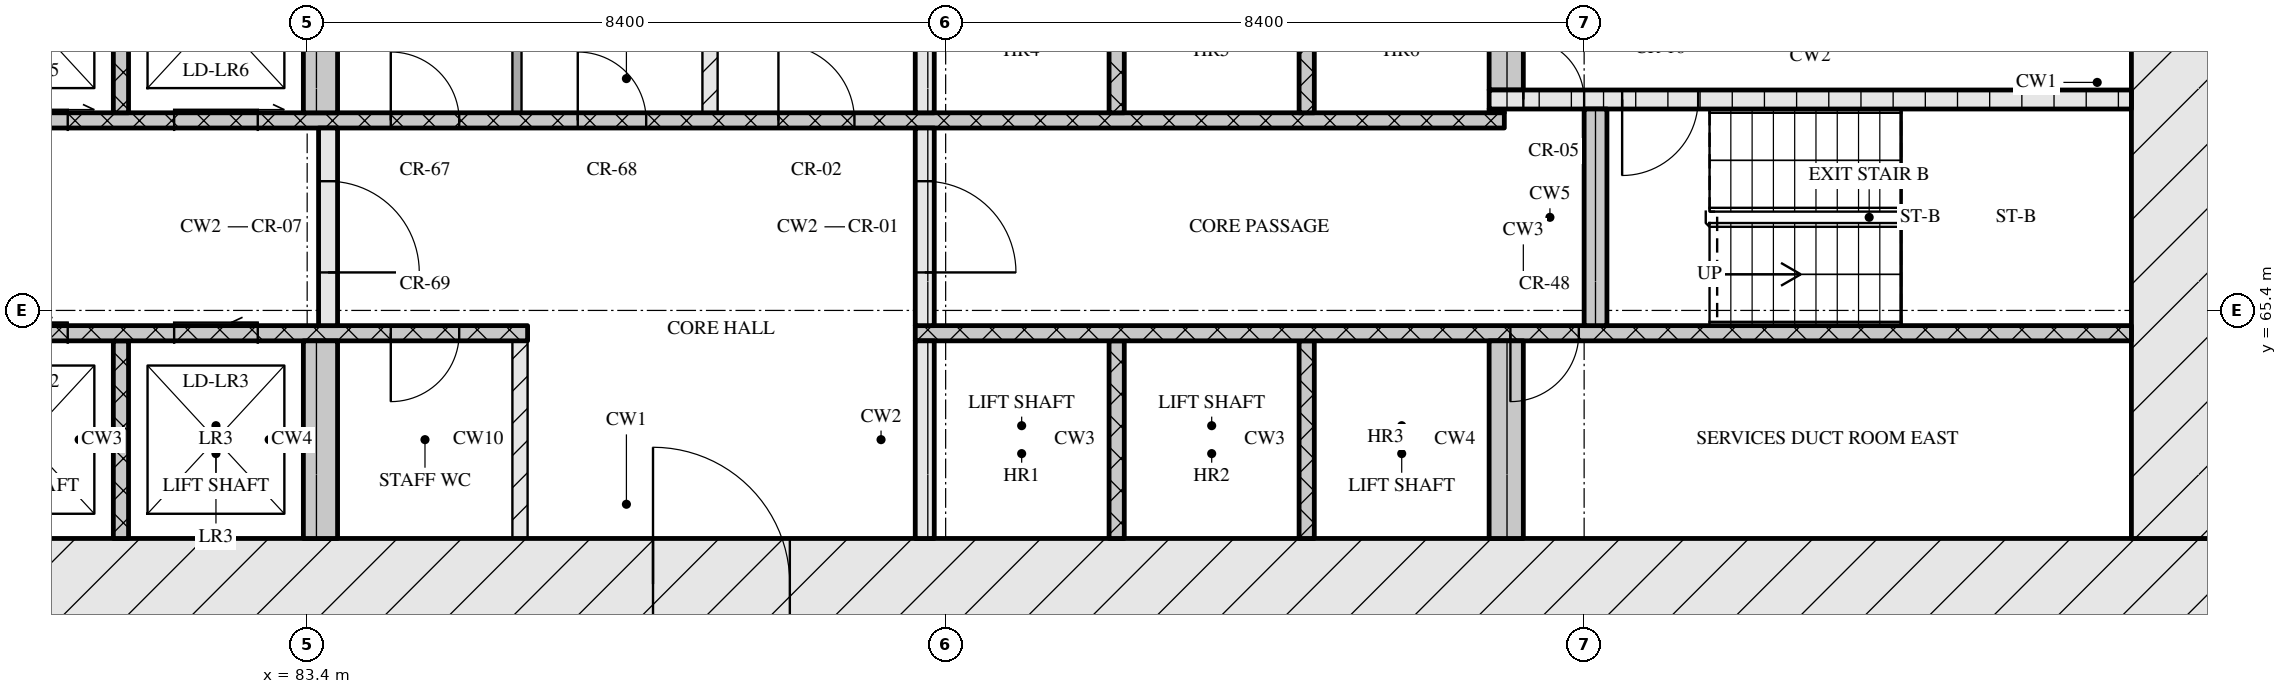
"""IFC4 building model, lengths in metres.
Left out: names, types, materials, properties, quantities, classifications, styles, units other than length and angle.
Written with IfcOpenShell. Run it as: python <this file> out.ifc"""

import sys

from ifc_helpers import new_model, si_unit, direction, frame, frame_2d, origin, place, context, subcontext, project, spatial, rectangle, extrude, element, fill, save


model = new_model("IFC4")
c1 = context("Model", 3, precision=1e-05, world=origin(), true_north=direction((0.0, 1.0)))
c2 = subcontext(c1, "Body", "Model", "MODEL_VIEW")
j1 = project(units=[si_unit("LENGTHUNIT", "METRE"), si_unit("PLANEANGLEUNIT", "RADIAN")], contexts=[c1])
p1 = place(None, origin())
s1 = spatial("IfcSite", under=j1, at=p1, CompositionType="ELEMENT")
p2 = place(p1, origin())
s2 = spatial("IfcBuilding", under=s1, at=p2, CompositionType="ELEMENT")
p3 = place(p2, frame((0.0, 0.0, 66.0)))
s3 = spatial("IfcBuildingStorey", under=s2, at=p3, CompositionType="ELEMENT", Elevation=66.0)
p4 = place(p3, frame((66.6, 61.8, 0.0), z_axis=(0.0, 0.0, 1.0), x_axis=(1.0, 0.0, 0.0)))
e1 = element("IfcWall", 1, at=p4, inside=s3, PredefinedType="SOLIDWALL", context=c2, shape_type="SweptSolid", body=[
    extrude(rectangle(XDim=42.0, YDim=1.2, at=frame_2d((21.0, 0.0))), origin(), (0.0, 0.0, 1.0), 3.32),
])
p5 = place(p4, frame((21.35, 0.0, 0.0)))
e2 = element("IfcOpeningElement", 2, at=p5, cuts=e1, PredefinedType="OPENING", context=c2, shape_type="SweptSolid", body=[
    extrude(rectangle(XDim=1.8, YDim=2.1, at=frame_2d((0.9, 1.05))), frame((0.0, 0.61, 0.0), z_axis=(0.0, -1.0, 0.0), x_axis=(1.0, 0.0, 0.0)), (0.0, 0.0, 1.0), 1.22),
])
p6 = place(p3, frame((108.0, 62.4, 0.0), z_axis=(0.0, 0.0, 1.0), x_axis=(0.0, 1.0, 0.0)))
e3 = element("IfcWall", 3, at=p6, inside=s3, PredefinedType="SOLIDWALL", context=c2, shape_type="SweptSolid", body=[
    extrude(rectangle(XDim=12.0, YDim=1.2, at=frame_2d((6.0, 0.0))), origin(), (0.0, 0.0, 1.0), 3.32),
])
p7 = place(p6, frame((6.45, 0.0, 0.0)))
e4 = element("IfcOpeningElement", 4, at=p7, cuts=e3, PredefinedType="OPENING", context=c2, shape_type="SweptSolid", body=[
    extrude(rectangle(XDim=1.2, YDim=2.1, at=frame_2d((0.6, 1.05))), frame((0.0, 0.61, 0.0), z_axis=(0.0, -1.0, 0.0), x_axis=(1.0, 0.0, 0.0)), (0.0, 0.0, 1.0), 1.22),
])
p8 = place(p3, frame((80.95, 62.4, 0.0), z_axis=(0.0, 0.0, 1.0), x_axis=(0.0, 1.0, 0.0)))
e5 = element("IfcWall", 5, at=p8, inside=s3, PredefinedType="SOLIDWALL", context=c2, shape_type="SweptSolid", body=[
    extrude(rectangle(XDim=2.6, YDim=0.2, at=frame_2d((1.3, 0.0))), origin(), (0.0, 0.0, 1.0), 3.32),
])
p9 = place(p3, frame((83.575, 62.4, 0.0), z_axis=(0.0, 0.0, 1.0), x_axis=(0.0, 1.0, 0.0)))
e6 = element("IfcWall", 6, at=p9, inside=s3, PredefinedType="SOLIDWALL", context=c2, shape_type="SweptSolid", body=[
    extrude(rectangle(XDim=2.6, YDim=0.45, at=frame_2d((1.3, 0.0))), origin(), (0.0, 0.0, 1.0), 3.32),
])
p10 = place(p3, frame((86.2, 62.4, 0.0), z_axis=(0.0, 0.0, 1.0), x_axis=(0.0, 1.0, 0.0)))
e7 = element("IfcWall", 7, at=p10, inside=s3, PredefinedType="PARTITIONING", context=c2, shape_type="SweptSolid", body=[
    extrude(rectangle(XDim=2.6, YDim=0.2, at=frame_2d((1.3, 0.0))), origin(), (0.0, 0.0, 1.0), 3.32),
])
p11 = place(p3, frame((91.525, 62.4, 0.0), z_axis=(0.0, 0.0, 1.0), x_axis=(0.0, 1.0, 0.0)))
e8 = element("IfcWall", 8, at=p11, inside=s3, PredefinedType="SOLIDWALL", context=c2, shape_type="SweptSolid", body=[
    extrude(rectangle(XDim=2.6, YDim=0.25, at=frame_2d((1.3, 0.0))), origin(), (0.0, 0.0, 1.0), 3.32),
])
for number, where, z_axis, x_axis in (
    (9, (94.05, 62.4, 0.0), (0.0, 0.0, 1.0), (0.0, 1.0, 0.0)),
    (10, (96.55, 62.4, 0.0), (0.0, 0.0, 1.0), (0.0, 1.0, 0.0)),
):
    element("IfcWall", number, at=place(p3, frame(where, z_axis=z_axis, x_axis=x_axis)), inside=s3, PredefinedType="SOLIDWALL", context=c2, shape_type="SweptSolid", body=[
        extrude(rectangle(XDim=2.6, YDim=0.2, at=frame_2d((1.3, 0.0))), origin(), (0.0, 0.0, 1.0), 3.32),
    ])
p12 = place(p3, frame((99.175, 62.4, 0.0), z_axis=(0.0, 0.0, 1.0), x_axis=(0.0, 1.0, 0.0)))
e11 = element("IfcWall", 11, at=p12, inside=s3, PredefinedType="SOLIDWALL", context=c2, shape_type="SweptSolid", body=[
    extrude(rectangle(XDim=2.6, YDim=0.45, at=frame_2d((1.3, 0.0))), origin(), (0.0, 0.0, 1.0), 3.32),
])
p13 = place(p3, frame((67.8, 65.1, 0.0), z_axis=(0.0, 0.0, 1.0), x_axis=(1.0, 0.0, 0.0)))
e12 = element("IfcWall", 12, at=p13, inside=s3, PredefinedType="SOLIDWALL", context=c2, shape_type="SweptSolid", body=[
    extrude(rectangle(XDim=18.5, YDim=0.2, at=frame_2d((9.25, 0.0))), origin(), (0.0, 0.0, 1.0), 3.32),
])
p14 = place(p13, frame((7.27, 0.0, 0.0)))
e13 = element("IfcOpeningElement", 13, at=p14, cuts=e12, PredefinedType="OPENING", context=c2, shape_type="SweptSolid", body=[
    extrude(rectangle(XDim=0.9, YDim=2.1, at=frame_2d((0.45, 1.05))), frame((0.0, 0.11, 0.0), z_axis=(0.0, -1.0, 0.0), x_axis=(1.0, 0.0, 0.0)), (0.0, 0.0, 1.0), 0.22),
])
p15 = place(p13, frame((8.85, 0.0, 0.0)))
e14 = element("IfcOpeningElement", 14, at=p15, cuts=e12, PredefinedType="OPENING", context=c2, shape_type="SweptSolid", body=[
    extrude(rectangle(XDim=1.1, YDim=2.1, at=frame_2d((0.55, 1.05))), frame((0.0, 0.11, 0.0), z_axis=(0.0, -1.0, 0.0), x_axis=(1.0, 0.0, 0.0)), (0.0, 0.0, 1.0), 0.22),
])
p16 = place(p13, frame((11.35, 0.0, 0.0)))
e15 = element("IfcOpeningElement", 15, at=p16, cuts=e12, PredefinedType="OPENING", context=c2, shape_type="SweptSolid", body=[
    extrude(rectangle(XDim=1.1, YDim=2.1, at=frame_2d((0.55, 1.05))), frame((0.0, 0.11, 0.0), z_axis=(0.0, -1.0, 0.0), x_axis=(1.0, 0.0, 0.0)), (0.0, 0.0, 1.0), 0.22),
])
p17 = place(p13, frame((13.85, 0.0, 0.0)))
e16 = element("IfcOpeningElement", 16, at=p17, cuts=e12, PredefinedType="OPENING", context=c2, shape_type="SweptSolid", body=[
    extrude(rectangle(XDim=1.1, YDim=2.1, at=frame_2d((0.55, 1.05))), frame((0.0, 0.11, 0.0), z_axis=(0.0, -1.0, 0.0), x_axis=(1.0, 0.0, 0.0)), (0.0, 0.0, 1.0), 0.22),
])
p18 = place(p13, frame((16.7, 0.0, 0.0)))
e17 = element("IfcOpeningElement", 17, at=p18, cuts=e12, PredefinedType="OPENING", context=c2, shape_type="SweptSolid", body=[
    extrude(rectangle(XDim=0.9, YDim=2.1, at=frame_2d((0.45, 1.05))), frame((0.0, 0.11, 0.0), z_axis=(0.0, -1.0, 0.0), x_axis=(1.0, 0.0, 0.0)), (0.0, 0.0, 1.0), 0.22),
])
p19 = place(p3, frame((91.4, 65.1, 0.0), z_axis=(0.0, 0.0, 1.0), x_axis=(1.0, 0.0, 0.0)))
e18 = element("IfcWall", 18, at=p19, inside=s3, PredefinedType="SOLIDWALL", context=c2, shape_type="SweptSolid", body=[
    extrude(rectangle(XDim=16.0, YDim=0.2, at=frame_2d((8.0, 0.0))), origin(), (0.0, 0.0, 1.0), 3.32),
])
p20 = place(p19, frame((7.83, 0.0, 0.0)))
e19 = element("IfcOpeningElement", 19, at=p20, cuts=e18, PredefinedType="OPENING", context=c2, shape_type="SweptSolid", body=[
    extrude(rectangle(XDim=0.9, YDim=2.1, at=frame_2d((0.45, 1.05))), frame((0.0, 0.11, 0.0), z_axis=(0.0, -1.0, 0.0), x_axis=(1.0, 0.0, 0.0)), (0.0, 0.0, 1.0), 0.22),
])
p21 = place(p3, frame((83.675, 65.2, 0.0), z_axis=(0.0, 0.0, 1.0), x_axis=(0.0, 1.0, 0.0)))
e20 = element("IfcWall", 20, at=p21, inside=s3, PredefinedType="SOLIDWALL", context=c2, shape_type="SweptSolid", body=[
    extrude(rectangle(XDim=2.6, YDim=0.25, at=frame_2d((1.3, 0.0))), origin(), (0.0, 0.0, 1.0), 3.32),
])
p22 = place(p21, frame((0.7, 0.0, 0.0)))
e21 = element("IfcOpeningElement", 21, at=p22, cuts=e20, PredefinedType="OPENING", context=c2, shape_type="SweptSolid", body=[
    extrude(rectangle(XDim=1.2, YDim=2.1, at=frame_2d((0.6, 1.05))), frame((0.0, 0.135, 0.0), z_axis=(0.0, -1.0, 0.0), x_axis=(1.0, 0.0, 0.0)), (0.0, 0.0, 1.0), 0.27),
])
p23 = place(p3, frame((91.525, 65.2, 0.0), z_axis=(0.0, 0.0, 1.0), x_axis=(0.0, 1.0, 0.0)))
e22 = element("IfcWall", 22, at=p23, inside=s3, PredefinedType="SOLIDWALL", context=c2, shape_type="SweptSolid", body=[
    extrude(rectangle(XDim=2.6, YDim=0.25, at=frame_2d((1.3, 0.0))), origin(), (0.0, 0.0, 1.0), 3.32),
])
p24 = place(p23, frame((0.7, 0.0, 0.0)))
e23 = element("IfcOpeningElement", 23, at=p24, cuts=e22, PredefinedType="OPENING", context=c2, shape_type="SweptSolid", body=[
    extrude(rectangle(XDim=1.2, YDim=2.1, at=frame_2d((0.6, 1.05))), frame((0.0, 0.135, 0.0), z_axis=(0.0, -1.0, 0.0), x_axis=(1.0, 0.0, 0.0)), (0.0, 0.0, 1.0), 0.27),
])
p25 = place(p3, frame((100.35, 65.2, 0.0), z_axis=(0.0, 0.0, 1.0), x_axis=(0.0, 1.0, 0.0)))
e24 = element("IfcWall", 24, at=p25, inside=s3, PredefinedType="SOLIDWALL", context=c2, shape_type="SweptSolid", body=[
    extrude(rectangle(XDim=2.85, YDim=0.3, at=frame_2d((1.425, 0.0))), origin(), (0.0, 0.0, 1.0), 3.32),
])
p26 = place(p3, frame((76.05, 67.9, 0.0), z_axis=(0.0, 0.0, 1.0), x_axis=(1.0, 0.0, 0.0)))
e25 = element("IfcWall", 25, at=p26, inside=s3, PredefinedType="SOLIDWALL", context=c2, shape_type="SweptSolid", body=[
    extrude(rectangle(XDim=23.1, YDim=0.2, at=frame_2d((11.55, 0.0))), origin(), (0.0, 0.0, 1.0), 3.32),
])
p27 = place(p26, frame((0.6, 0.0, 0.0)))
e26 = element("IfcOpeningElement", 26, at=p27, cuts=e25, PredefinedType="OPENING", context=c2, shape_type="SweptSolid", body=[
    extrude(rectangle(XDim=1.1, YDim=2.1, at=frame_2d((0.55, 1.05))), frame((0.0, 0.11, 0.0), z_axis=(0.0, -1.0, 0.0), x_axis=(1.0, 0.0, 0.0)), (0.0, 0.0, 1.0), 0.22),
])
p28 = place(p26, frame((3.1, 0.0, 0.0)))
e27 = element("IfcOpeningElement", 27, at=p28, cuts=e25, PredefinedType="OPENING", context=c2, shape_type="SweptSolid", body=[
    extrude(rectangle(XDim=1.1, YDim=2.1, at=frame_2d((0.55, 1.05))), frame((0.0, 0.11, 0.0), z_axis=(0.0, -1.0, 0.0), x_axis=(1.0, 0.0, 0.0)), (0.0, 0.0, 1.0), 0.22),
])
p29 = place(p26, frame((5.6, 0.0, 0.0)))
e28 = element("IfcOpeningElement", 28, at=p29, cuts=e25, PredefinedType="OPENING", context=c2, shape_type="SweptSolid", body=[
    extrude(rectangle(XDim=1.1, YDim=2.1, at=frame_2d((0.55, 1.05))), frame((0.0, 0.11, 0.0), z_axis=(0.0, -1.0, 0.0), x_axis=(1.0, 0.0, 0.0)), (0.0, 0.0, 1.0), 0.22),
])
p30 = place(p26, frame((8.45, 0.0, 0.0)))
e29 = element("IfcOpeningElement", 29, at=p30, cuts=e25, PredefinedType="OPENING", context=c2, shape_type="SweptSolid", body=[
    extrude(rectangle(XDim=0.9, YDim=2.1, at=frame_2d((0.45, 1.05))), frame((0.0, 0.11, 0.0), z_axis=(0.0, -1.0, 0.0), x_axis=(1.0, 0.0, 0.0)), (0.0, 0.0, 1.0), 0.22),
])
p31 = place(p26, frame((10.91, 0.0, 0.0)))
e30 = element("IfcOpeningElement", 30, at=p31, cuts=e25, PredefinedType="OPENING", context=c2, shape_type="SweptSolid", body=[
    extrude(rectangle(XDim=0.9, YDim=2.1, at=frame_2d((0.45, 1.05))), frame((0.0, 0.11, 0.0), z_axis=(0.0, -1.0, 0.0), x_axis=(1.0, 0.0, 0.0)), (0.0, 0.0, 1.0), 0.22),
])
p32 = place(p26, frame((13.55, 0.0, 0.0)))
e31 = element("IfcOpeningElement", 31, at=p32, cuts=e25, PredefinedType="OPENING", context=c2, shape_type="SweptSolid", body=[
    extrude(rectangle(XDim=1.0, YDim=2.1, at=frame_2d((0.5, 1.05))), frame((0.0, 0.11, 0.0), z_axis=(0.0, -1.0, 0.0), x_axis=(1.0, 0.0, 0.0)), (0.0, 0.0, 1.0), 0.22),
])
p33 = place(p3, frame((80.95, 68.0, 0.0), z_axis=(0.0, 0.0, 1.0), x_axis=(0.0, 1.0, 0.0)))
e32 = element("IfcWall", 32, at=p33, inside=s3, PredefinedType="SOLIDWALL", context=c2, shape_type="SweptSolid", body=[
    extrude(rectangle(XDim=2.6, YDim=0.2, at=frame_2d((1.3, 0.0))), origin(), (0.0, 0.0, 1.0), 3.32),
])
p34 = place(p3, frame((83.575, 68.0, 0.0), z_axis=(0.0, 0.0, 1.0), x_axis=(0.0, 1.0, 0.0)))
e33 = element("IfcWall", 33, at=p34, inside=s3, PredefinedType="SOLIDWALL", context=c2, shape_type="SweptSolid", body=[
    extrude(rectangle(XDim=2.6, YDim=0.45, at=frame_2d((1.3, 0.0))), origin(), (0.0, 0.0, 1.0), 3.32),
])
p35 = place(p3, frame((86.16, 68.0, 0.0), z_axis=(0.0, 0.0, 1.0), x_axis=(0.0, 1.0, 0.0)))
e34 = element("IfcWall", 34, at=p35, inside=s3, PredefinedType="PARTITIONING", context=c2, shape_type="SweptSolid", body=[
    extrude(rectangle(XDim=2.6, YDim=0.12, at=frame_2d((1.3, 0.0))), origin(), (0.0, 0.0, 1.0), 3.32),
])
p36 = place(p3, frame((88.7, 68.0, 0.0), z_axis=(0.0, 0.0, 1.0), x_axis=(0.0, 1.0, 0.0)))
e35 = element("IfcWall", 35, at=p36, inside=s3, PredefinedType="PARTITIONING", context=c2, shape_type="SweptSolid", body=[
    extrude(rectangle(XDim=2.6, YDim=0.2, at=frame_2d((1.3, 0.0))), origin(), (0.0, 0.0, 1.0), 3.32),
])
p37 = place(p3, frame((91.525, 68.0, 0.0), z_axis=(0.0, 0.0, 1.0), x_axis=(0.0, 1.0, 0.0)))
e36 = element("IfcWall", 36, at=p37, inside=s3, PredefinedType="SOLIDWALL", context=c2, shape_type="SweptSolid", body=[
    extrude(rectangle(XDim=2.6, YDim=0.25, at=frame_2d((1.3, 0.0))), origin(), (0.0, 0.0, 1.0), 3.32),
])
for number, where, z_axis, x_axis in (
    (37, (94.05, 68.0, 0.0), (0.0, 0.0, 1.0), (0.0, 1.0, 0.0)),
    (38, (96.55, 68.0, 0.0), (0.0, 0.0, 1.0), (0.0, 1.0, 0.0)),
):
    element("IfcWall", number, at=place(p3, frame(where, z_axis=z_axis, x_axis=x_axis)), inside=s3, PredefinedType="SOLIDWALL", context=c2, shape_type="SweptSolid", body=[
        extrude(rectangle(XDim=2.6, YDim=0.2, at=frame_2d((1.3, 0.0))), origin(), (0.0, 0.0, 1.0), 3.32),
    ])
p38 = place(p3, frame((98.95, 68.025, 0.0), z_axis=(0.0, 0.0, 1.0), x_axis=(1.0, 0.0, 0.0)))
e39 = element("IfcWall", 39, at=p38, inside=s3, PredefinedType="SOLIDWALL", context=c2, shape_type="SweptSolid", body=[
    extrude(rectangle(XDim=0.2, YDim=0.05, at=frame_2d((0.1, 0.0))), origin(), (0.0, 0.0, 1.0), 3.32),
])
p39 = place(p3, frame((98.95, 68.175, 0.0), z_axis=(0.0, 0.0, 1.0), x_axis=(1.0, 0.0, 0.0)))
e40 = element("IfcWall", 40, at=p39, inside=s3, PredefinedType="SOLIDWALL", context=c2, shape_type="SweptSolid", body=[
    extrude(rectangle(XDim=8.45, YDim=0.25, at=frame_2d((4.225, 0.0))), origin(), (0.0, 0.0, 1.0), 3.32),
])
p40 = place(p39, frame((0.45, 0.0, 0.0)))
e41 = element("IfcOpeningElement", 41, at=p40, cuts=e40, PredefinedType="OPENING", context=c2, shape_type="SweptSolid", body=[
    extrude(rectangle(XDim=0.8, YDim=2.1, at=frame_2d((0.4, 1.05))), frame((0.0, 0.135, 0.0), z_axis=(0.0, -1.0, 0.0), x_axis=(1.0, 0.0, 0.0)), (0.0, 0.0, 1.0), 0.27),
])
p41 = place(p39, frame((1.75, 0.0, 0.0)))
e42 = element("IfcOpeningElement", 42, at=p41, cuts=e40, PredefinedType="OPENING", context=c2, shape_type="SweptSolid", body=[
    extrude(rectangle(XDim=1.0, YDim=2.1, at=frame_2d((0.5, 1.05))), frame((0.0, 0.135, 0.0), z_axis=(0.0, -1.0, 0.0), x_axis=(1.0, 0.0, 0.0)), (0.0, 0.0, 1.0), 0.27),
])
p42 = place(p3, frame((99.175, 68.3, 0.0), z_axis=(0.0, 0.0, 1.0), x_axis=(0.0, 1.0, 0.0)))
e43 = element("IfcWall", 43, at=p42, inside=s3, PredefinedType="SOLIDWALL", context=c2, shape_type="SweptSolid", body=[
    extrude(rectangle(XDim=2.3, YDim=0.45, at=frame_2d((1.15, 0.0))), origin(), (0.0, 0.0, 1.0), 3.32),
])
p43 = place(p5, origin())
e44 = element("IfcDoor", 44, at=p43, inside=s3, OperationType="DOUBLE_DOOR_SINGLE_SWING", PredefinedType="DOOR", context=c2, shape_type="SweptSolid", body=[
    extrude(rectangle(XDim=1.8, YDim=2.1, at=frame_2d((0.9, 1.05))), frame((0.0, 0.025, 0.0), z_axis=(0.0, -1.0, 0.0), x_axis=(1.0, 0.0, 0.0)), (0.0, 0.0, 1.0), 0.05),
])
fill(e2, e44)
p44 = place(p16, origin())
e45 = element("IfcDoor", 45, at=p44, inside=s3, OperationType="SLIDING_TO_LEFT", PredefinedType="DOOR", context=c2, shape_type="SweptSolid", body=[
    extrude(rectangle(XDim=1.1, YDim=2.1, at=frame_2d((0.55, 1.05))), frame((0.0, 0.025, 0.0), z_axis=(0.0, -1.0, 0.0), x_axis=(1.0, 0.0, 0.0)), (0.0, 0.0, 1.0), 0.05),
])
fill(e15, e45)
p45 = place(p17, origin())
e46 = element("IfcDoor", 46, at=p45, inside=s3, OperationType="SLIDING_TO_LEFT", PredefinedType="DOOR", context=c2, shape_type="SweptSolid", body=[
    extrude(rectangle(XDim=1.1, YDim=2.1, at=frame_2d((0.55, 1.05))), frame((0.0, 0.025, 0.0), z_axis=(0.0, -1.0, 0.0), x_axis=(1.0, 0.0, 0.0)), (0.0, 0.0, 1.0), 0.05),
])
fill(e16, e46)
p46 = place(p18, origin())
e47 = element("IfcDoor", 47, at=p46, inside=s3, OperationType="SINGLE_SWING_RIGHT", PredefinedType="DOOR", context=c2, shape_type="SweptSolid", body=[
    extrude(rectangle(XDim=0.9, YDim=2.1, at=frame_2d((0.45, 1.05))), frame((0.0, 0.025, 0.0), z_axis=(0.0, -1.0, 0.0), x_axis=(1.0, 0.0, 0.0)), (0.0, 0.0, 1.0), 0.05),
])
fill(e17, e47)
p47 = place(p20, origin())
e48 = element("IfcDoor", 48, at=p47, inside=s3, OperationType="SINGLE_SWING_RIGHT", PredefinedType="DOOR", context=c2, shape_type="SweptSolid", body=[
    extrude(rectangle(XDim=0.9, YDim=2.1, at=frame_2d((0.45, 1.05))), frame((0.0, 0.025, 0.0), z_axis=(0.0, -1.0, 0.0), x_axis=(1.0, 0.0, 0.0)), (0.0, 0.0, 1.0), 0.05),
])
fill(e19, e48)
p48 = place(p22, origin())
e49 = element("IfcDoor", 49, at=p48, inside=s3, OperationType="SINGLE_SWING_RIGHT", PredefinedType="DOOR", context=c2, shape_type="SweptSolid", body=[
    extrude(rectangle(XDim=1.2, YDim=2.1, at=frame_2d((0.6, 1.05))), frame((0.0, 0.025, 0.0), z_axis=(0.0, -1.0, 0.0), x_axis=(1.0, 0.0, 0.0)), (0.0, 0.0, 1.0), 0.05),
])
fill(e21, e49)
p49 = place(p24, origin())
e50 = element("IfcDoor", 50, at=p49, inside=s3, OperationType="SINGLE_SWING_RIGHT", PredefinedType="DOOR", context=c2, shape_type="SweptSolid", body=[
    extrude(rectangle(XDim=1.2, YDim=2.1, at=frame_2d((0.6, 1.05))), frame((0.0, 0.025, 0.0), z_axis=(0.0, -1.0, 0.0), x_axis=(1.0, 0.0, 0.0)), (0.0, 0.0, 1.0), 0.05),
])
fill(e23, e50)
p50 = place(p28, origin())
e51 = element("IfcDoor", 51, at=p50, inside=s3, OperationType="SLIDING_TO_RIGHT", PredefinedType="DOOR", context=c2, shape_type="SweptSolid", body=[
    extrude(rectangle(XDim=1.1, YDim=2.1, at=frame_2d((0.55, 1.05))), frame((0.0, 0.025, 0.0), z_axis=(0.0, -1.0, 0.0), x_axis=(1.0, 0.0, 0.0)), (0.0, 0.0, 1.0), 0.05),
])
fill(e27, e51)
p51 = place(p29, origin())
e52 = element("IfcDoor", 52, at=p51, inside=s3, OperationType="SLIDING_TO_RIGHT", PredefinedType="DOOR", context=c2, shape_type="SweptSolid", body=[
    extrude(rectangle(XDim=1.1, YDim=2.1, at=frame_2d((0.55, 1.05))), frame((0.0, 0.025, 0.0), z_axis=(0.0, -1.0, 0.0), x_axis=(1.0, 0.0, 0.0)), (0.0, 0.0, 1.0), 0.05),
])
fill(e28, e52)
p52 = place(p30, origin())
e53 = element("IfcDoor", 53, at=p52, inside=s3, OperationType="SINGLE_SWING_LEFT", PredefinedType="DOOR", context=c2, shape_type="SweptSolid", body=[
    extrude(rectangle(XDim=0.9, YDim=2.1, at=frame_2d((0.45, 1.05))), frame((0.0, 0.025, 0.0), z_axis=(0.0, -1.0, 0.0), x_axis=(1.0, 0.0, 0.0)), (0.0, 0.0, 1.0), 0.05),
])
fill(e29, e53)
p53 = place(p31, origin())
e54 = element("IfcDoor", 54, at=p53, inside=s3, OperationType="SINGLE_SWING_LEFT", PredefinedType="DOOR", context=c2, shape_type="SweptSolid", body=[
    extrude(rectangle(XDim=0.9, YDim=2.1, at=frame_2d((0.45, 1.05))), frame((0.0, 0.025, 0.0), z_axis=(0.0, -1.0, 0.0), x_axis=(1.0, 0.0, 0.0)), (0.0, 0.0, 1.0), 0.05),
])
fill(e30, e54)
p54 = place(p32, origin())
e55 = element("IfcDoor", 55, at=p54, inside=s3, OperationType="SINGLE_SWING_LEFT", PredefinedType="DOOR", context=c2, shape_type="SweptSolid", body=[
    extrude(rectangle(XDim=1.0, YDim=2.1, at=frame_2d((0.5, 1.05))), frame((0.0, 0.025, 0.0), z_axis=(0.0, -1.0, 0.0), x_axis=(1.0, 0.0, 0.0)), (0.0, 0.0, 1.0), 0.05),
])
fill(e31, e55)
p55 = place(p40, origin())
e56 = element("IfcDoor", 56, at=p55, inside=s3, OperationType="SINGLE_SWING_LEFT", PredefinedType="DOOR", context=c2, shape_type="SweptSolid", body=[
    extrude(rectangle(XDim=0.8, YDim=2.1, at=frame_2d((0.4, 1.05))), frame((0.0, 0.025, 0.0), z_axis=(0.0, -1.0, 0.0), x_axis=(1.0, 0.0, 0.0)), (0.0, 0.0, 1.0), 0.05),
])
fill(e41, e56)
p56 = place(p41, origin())
e57 = element("IfcDoor", 57, at=p56, inside=s3, OperationType="SINGLE_SWING_RIGHT", PredefinedType="DOOR", context=c2, shape_type="SweptSolid", body=[
    extrude(rectangle(XDim=1.0, YDim=2.1, at=frame_2d((0.5, 1.05))), frame((0.0, 0.025, 0.0), z_axis=(0.0, -1.0, 0.0), x_axis=(1.0, 0.0, 0.0)), (0.0, 0.0, 1.0), 0.05),
])
fill(e42, e57)
save(model, sys.argv[1])
